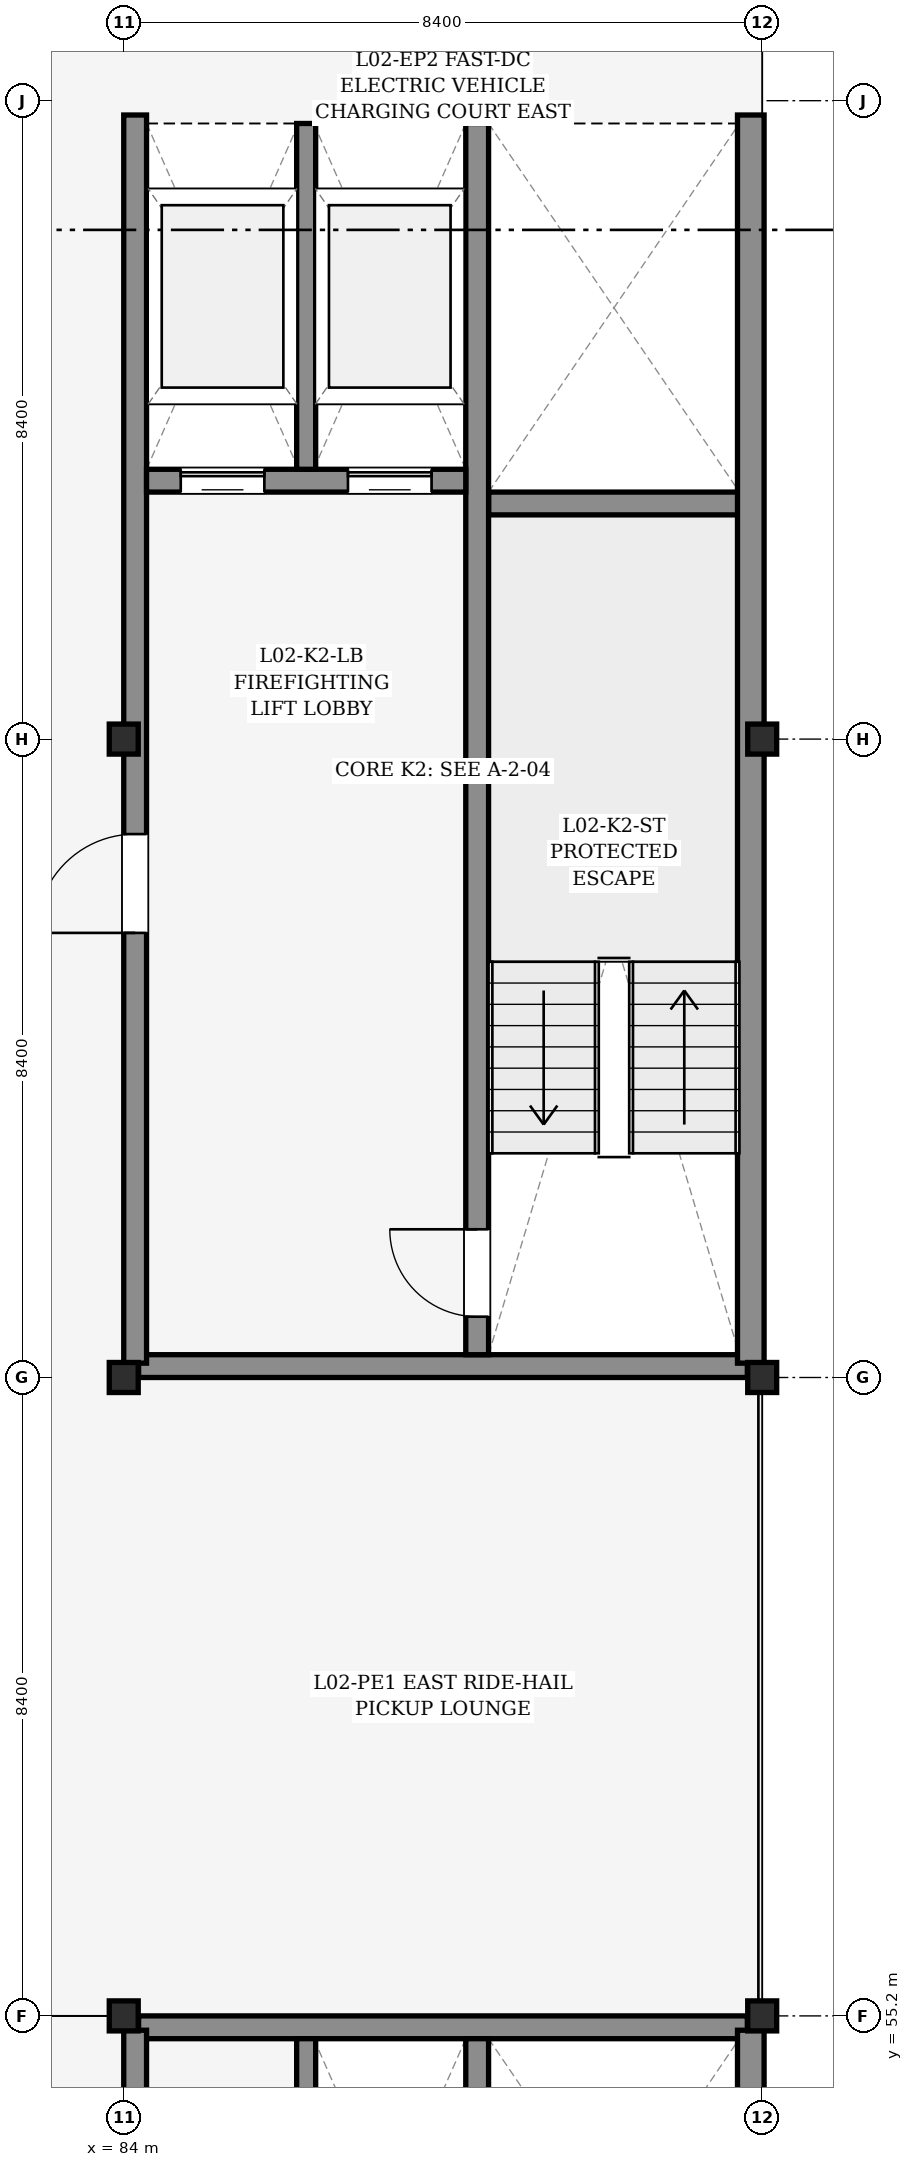
"""IFC4 building model, lengths in metres.
Left out: names, types, materials, properties, quantities, classifications, styles, units other than length and angle.
Written with IfcOpenShell. Run it as: python <this file> out.ifc"""

import sys

from ifc_helpers import new_model, si_unit, direction, frame, frame_2d, origin, origin_2d, place, context, subcontext, project, spatial, rectangle, i_section, extrude, element, fill, save


model = new_model("IFC4")
c1 = context("Model", 3, precision=1e-05, world=origin(), true_north=direction((0.0, 1.0)))
c2 = subcontext(c1, "Body", "Model", "MODEL_VIEW")
j1 = project(units=[si_unit("LENGTHUNIT", "METRE"), si_unit("PLANEANGLEUNIT", "RADIAN")], contexts=[c1])
p1 = place(None, origin())
s1 = spatial("IfcSite", under=j1, at=p1, CompositionType="ELEMENT")
p2 = place(p1, origin())
s2 = spatial("IfcBuilding", under=s1, at=p2, CompositionType="ELEMENT")
p3 = place(p2, frame((0.0, 0.0, 9.0)))
s3 = spatial("IfcBuildingStorey", under=s2, at=p3, CompositionType="ELEMENT", Elevation=9.0)
for number, where, z_axis, x_axis in (
    (1, (84.0, 55.2, 0.0), (0.0, 0.0, 1.0), (1.0, 0.0, 0.0)),
    (2, (84.0, 63.6, 0.0), (0.0, 0.0, 1.0), (1.0, 0.0, 0.0)),
    (3, (84.0, 72.0, 0.0), (0.0, 0.0, 1.0), (1.0, 0.0, 0.0)),
    (4, (84.0, 80.4, 0.0), (0.0, 0.0, 1.0), (1.0, 0.0, 0.0)),
    (5, (92.4, 55.2, 0.0), (0.0, 0.0, 1.0), (1.0, 0.0, 0.0)),
    (6, (92.4, 63.6, 0.0), (0.0, 0.0, 1.0), (1.0, 0.0, 0.0)),
    (7, (92.4, 72.0, 0.0), (0.0, 0.0, 1.0), (1.0, 0.0, 0.0)),
    (8, (92.4, 80.4, 0.0), (0.0, 0.0, 1.0), (1.0, 0.0, 0.0)),
):
    element("IfcColumn", number, at=place(p3, frame(where, z_axis=z_axis, x_axis=x_axis)), inside=s3, PredefinedType="COLUMN", context=c2, shape_type="SweptSolid", body=[
        extrude(i_section(OverallWidth=0.395, OverallDepth=0.381, WebThickness=0.018, FlangeThickness=0.03, FilletRadius=0.015, at=origin_2d()), origin(), (0.0, 0.0, 1.0), 3.6),
    ])
for number, where, z_axis, x_axis in (
    (9, (84.196, 63.75, 0.0), (0.0, 0.0, 1.0), (1.0, 0.0, 0.0)),
    (10, (84.196, 80.25, 0.0), (0.0, 0.0, 1.0), (1.0, 0.0, 0.0)),
):
    element("IfcWall", number, at=place(p3, frame(where, z_axis=z_axis, x_axis=x_axis)), inside=s3, PredefinedType="SHEAR", context=c2, shape_type="SweptSolid", body=[
        extrude(rectangle(XDim=8.009, YDim=0.3, at=frame_2d((4.004, 0.0))), origin(), (0.0, 0.0, 1.0), 3.38),
    ])
p4 = place(p3, frame((88.8, 75.1, 0.0), z_axis=(0.0, 0.0, 1.0), x_axis=(1.0, 0.0, 0.0)))
e11 = element("IfcWall", 11, at=p4, inside=s3, PredefinedType="SHEAR", context=c2, shape_type="SweptSolid", body=[
    extrude(rectangle(XDim=3.3, YDim=0.3, at=frame_2d((1.65, 0.0))), origin(), (0.0, 0.0, 1.0), 3.38),
])
p5 = place(p3, frame((92.25, 63.789, 0.0), z_axis=(0.0, 0.0, 1.0), x_axis=(0.0, 1.0, 0.0)))
e12 = element("IfcWall", 12, at=p5, inside=s3, PredefinedType="SHEAR", context=c2, shape_type="SweptSolid", body=[
    extrude(rectangle(XDim=16.423, YDim=0.35, at=frame_2d((8.211, 0.0))), origin(), (0.0, 0.0, 1.0), 3.38),
])
p6 = place(p3, frame((84.15, 63.789, 0.0), z_axis=(0.0, 0.0, 1.0), x_axis=(0.0, 1.0, 0.0)))
e13 = element("IfcWall", 13, at=p6, inside=s3, PredefinedType="SHEAR", context=c2, shape_type="SweptSolid", body=[
    extrude(rectangle(XDim=16.423, YDim=0.3, at=frame_2d((8.211, 0.0))), origin(), (0.0, 0.0, 1.0), 3.38),
])
p7 = place(p6, frame((5.662, 0.0, 0.0)))
e14 = element("IfcOpeningElement", 14, at=p7, cuts=e13, PredefinedType="OPENING", context=c2, shape_type="SweptSolid", body=[
    extrude(rectangle(XDim=1.3, YDim=2.2, at=frame_2d((0.65, 1.1))), frame((0.0, 0.16, 0.0), z_axis=(0.0, -1.0, 0.0), x_axis=(1.0, 0.0, 0.0)), (0.0, 0.0, 1.0), 0.32),
])
p8 = place(p3, frame((88.65, 63.9, 0.0), z_axis=(0.0, 0.0, 1.0), x_axis=(0.0, 1.0, 0.0)))
e15 = element("IfcWall", 15, at=p8, inside=s3, PredefinedType="SHEAR", context=c2, shape_type="SweptSolid", body=[
    extrude(rectangle(XDim=16.2, YDim=0.3, at=frame_2d((8.1, 0.0))), origin(), (0.0, 0.0, 1.0), 3.38),
])
p9 = place(p8, frame((0.5, 0.0, 0.0)))
e16 = element("IfcOpeningElement", 16, at=p9, cuts=e15, PredefinedType="OPENING", context=c2, shape_type="SweptSolid", body=[
    extrude(rectangle(XDim=1.15, YDim=2.15, at=frame_2d((0.575, 1.075))), frame((0.0, 0.16, 0.0), z_axis=(0.0, -1.0, 0.0), x_axis=(1.0, 0.0, 0.0)), (0.0, 0.0, 1.0), 0.32),
])
p10 = place(p3, frame((84.3, 75.4, 0.0), z_axis=(0.0, 0.0, 1.0), x_axis=(1.0, 0.0, 0.0)))
e17 = element("IfcWall", 17, at=p10, inside=s3, PredefinedType="SHEAR", context=c2, shape_type="SweptSolid", body=[
    extrude(rectangle(XDim=4.2, YDim=0.3, at=frame_2d((2.1, 0.0))), origin(), (0.0, 0.0, 1.0), 3.38),
])
p11 = place(p10, frame((0.45, 0.0, 0.0)))
e18 = element("IfcOpeningElement", 18, at=p11, cuts=e17, PredefinedType="OPENING", context=c2, shape_type="SweptSolid", body=[
    extrude(rectangle(XDim=1.1, YDim=2.2, at=frame_2d((0.55, 1.1))), frame((0.0, 0.16, 0.0), z_axis=(0.0, -1.0, 0.0), x_axis=(1.0, 0.0, 0.0)), (0.0, 0.0, 1.0), 0.32),
])
p12 = place(p10, frame((2.65, 0.0, 0.0)))
e19 = element("IfcOpeningElement", 19, at=p12, cuts=e17, PredefinedType="OPENING", context=c2, shape_type="SweptSolid", body=[
    extrude(rectangle(XDim=1.1, YDim=2.2, at=frame_2d((0.55, 1.1))), frame((0.0, 0.16, 0.0), z_axis=(0.0, -1.0, 0.0), x_axis=(1.0, 0.0, 0.0)), (0.0, 0.0, 1.0), 0.32),
])
p13 = place(p3, frame((86.4, 75.55, 0.0), z_axis=(0.0, 0.0, 1.0), x_axis=(0.0, 1.0, 0.0)))
e20 = element("IfcWall", 20, at=p13, inside=s3, PredefinedType="PARTITIONING", context=c2, shape_type="SweptSolid", body=[
    extrude(rectangle(XDim=4.55, YDim=0.25, at=frame_2d((2.275, 0.0))), origin(), (0.0, 0.0, 1.0), 2.525),
])
p14 = place(p3, frame((84.196, 55.05, 0.0), z_axis=(0.0, 0.0, 1.0), x_axis=(1.0, 0.0, 0.0)))
e21 = element("IfcWall", 21, at=p14, inside=s3, PredefinedType="SHEAR", context=c2, shape_type="SweptSolid", body=[
    extrude(rectangle(XDim=8.009, YDim=0.3, at=frame_2d((4.004, 0.0))), origin(), (0.0, 0.0, 1.0), 3.38),
])
p15 = place(p3, frame((92.25, 38.588, 0.0), z_axis=(0.0, 0.0, 1.0), x_axis=(0.0, 1.0, 0.0)))
e22 = element("IfcWall", 22, at=p15, inside=s3, PredefinedType="SHEAR", context=c2, shape_type="SweptSolid", body=[
    extrude(rectangle(XDim=16.423, YDim=0.35, at=frame_2d((8.211, 0.0))), origin(), (0.0, 0.0, 1.0), 3.38),
])
p16 = place(p3, frame((84.15, 38.588, 0.0), z_axis=(0.0, 0.0, 1.0), x_axis=(0.0, 1.0, 0.0)))
e23 = element("IfcWall", 23, at=p16, inside=s3, PredefinedType="SHEAR", context=c2, shape_type="SweptSolid", body=[
    extrude(rectangle(XDim=16.423, YDim=0.3, at=frame_2d((8.211, 0.0))), origin(), (0.0, 0.0, 1.0), 3.38),
])
p17 = place(p16, frame((5.662, 0.0, 0.0)))
e24 = element("IfcOpeningElement", 24, at=p17, cuts=e23, PredefinedType="OPENING", context=c2, shape_type="SweptSolid", body=[
    extrude(rectangle(XDim=1.25, YDim=2.15, at=frame_2d((0.625, 1.075))), frame((0.0, 0.16, 0.0), z_axis=(0.0, -1.0, 0.0), x_axis=(1.0, 0.0, 0.0)), (0.0, 0.0, 1.0), 0.32),
])
p18 = place(p3, frame((88.65, 38.7, 0.0), z_axis=(0.0, 0.0, 1.0), x_axis=(0.0, 1.0, 0.0)))
e25 = element("IfcWall", 25, at=p18, inside=s3, PredefinedType="SHEAR", context=c2, shape_type="SweptSolid", body=[
    extrude(rectangle(XDim=16.2, YDim=0.3, at=frame_2d((8.1, 0.0))), origin(), (0.0, 0.0, 1.0), 3.38),
])
p19 = place(p18, frame((0.5, 0.0, 0.0)))
e26 = element("IfcOpeningElement", 26, at=p19, cuts=e25, PredefinedType="OPENING", context=c2, shape_type="SweptSolid", body=[
    extrude(rectangle(XDim=1.15, YDim=2.15, at=frame_2d((0.575, 1.075))), frame((0.0, 0.16, 0.0), z_axis=(0.0, -1.0, 0.0), x_axis=(1.0, 0.0, 0.0)), (0.0, 0.0, 1.0), 0.32),
])
p20 = place(p3, frame((86.4, 50.35, 0.0), z_axis=(0.0, 0.0, 1.0), x_axis=(0.0, 1.0, 0.0)))
e27 = element("IfcWall", 27, at=p20, inside=s3, PredefinedType="PARTITIONING", context=c2, shape_type="SweptSolid", body=[
    extrude(rectangle(XDim=4.55, YDim=0.25, at=frame_2d((2.275, 0.0))), origin(), (0.0, 0.0, 1.0), 2.525),
])
p21 = place(p7, origin())
e28 = element("IfcDoor", 28, at=p21, inside=s3, OperationType="SINGLE_SWING_LEFT", PredefinedType="DOOR", context=c2, shape_type="SweptSolid", body=[
    extrude(rectangle(XDim=1.3, YDim=2.2, at=frame_2d((0.65, 1.1))), frame((0.0, 0.025, 0.0), z_axis=(0.0, -1.0, 0.0), x_axis=(1.0, 0.0, 0.0)), (0.0, 0.0, 1.0), 0.05),
])
fill(e14, e28)
p22 = place(p9, origin())
e29 = element("IfcDoor", 29, at=p22, inside=s3, OperationType="SINGLE_SWING_RIGHT", PredefinedType="DOOR", context=c2, shape_type="SweptSolid", body=[
    extrude(rectangle(XDim=1.15, YDim=2.15, at=frame_2d((0.575, 1.075))), frame((0.0, 0.025, 0.0), z_axis=(0.0, -1.0, 0.0), x_axis=(1.0, 0.0, 0.0)), (0.0, 0.0, 1.0), 0.05),
])
fill(e16, e29)
p23 = place(p11, origin())
e30 = element("IfcDoor", 30, at=p23, inside=s3, OperationType="SLIDING_TO_LEFT", PredefinedType="DOOR", context=c2, shape_type="SweptSolid", body=[
    extrude(rectangle(XDim=1.1, YDim=2.2, at=frame_2d((0.55, 1.1))), frame((0.0, 0.025, 0.0), z_axis=(0.0, -1.0, 0.0), x_axis=(1.0, 0.0, 0.0)), (0.0, 0.0, 1.0), 0.05),
])
fill(e18, e30)
p24 = place(p12, origin())
e31 = element("IfcDoor", 31, at=p24, inside=s3, OperationType="SLIDING_TO_LEFT", PredefinedType="DOOR", context=c2, shape_type="SweptSolid", body=[
    extrude(rectangle(XDim=1.1, YDim=2.2, at=frame_2d((0.55, 1.1))), frame((0.0, 0.025, 0.0), z_axis=(0.0, -1.0, 0.0), x_axis=(1.0, 0.0, 0.0)), (0.0, 0.0, 1.0), 0.05),
])
fill(e19, e31)
save(model, sys.argv[1])
